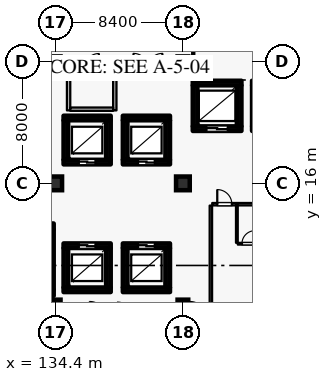
"""IFC4 building model, lengths in metres.
Left out: names, types, materials, properties, quantities, classifications, styles, units other than length and angle.
Written with IfcOpenShell. Run it as: python <this file> out.ifc"""

import sys

from ifc_helpers import new_model, si_unit, direction, frame, frame_2d, origin, origin_2d, place, context, subcontext, project, spatial, rectangle, extrude, element, fill, save


model = new_model("IFC4")
c1 = context("Model", 3, precision=1e-05, world=origin(), true_north=direction((0.0, 1.0)))
c2 = subcontext(c1, "Body", "Model", "MODEL_VIEW")
j1 = project(units=[si_unit("LENGTHUNIT", "METRE"), si_unit("PLANEANGLEUNIT", "RADIAN")], contexts=[c1])
p1 = place(None, origin())
s1 = spatial("IfcSite", under=j1, at=p1, CompositionType="ELEMENT")
p2 = place(p1, origin())
s2 = spatial("IfcBuilding", under=s1, at=p2, CompositionType="ELEMENT")
p3 = place(p2, frame((0.0, 0.0, 16.2)))
s3 = spatial("IfcBuildingStorey", under=s2, at=p3, CompositionType="ELEMENT", Elevation=16.2)
for number, where, z_axis, x_axis in (
    (1, (134.4, 16.0, 0.0), (0.0, 0.0, 1.0), (1.0, 0.0, 0.0)),
    (2, (142.8, 16.0, 0.0), (0.0, 0.0, 1.0), (1.0, 0.0, 0.0)),
):
    element("IfcColumn", number, at=place(p3, frame(where, z_axis=z_axis, x_axis=x_axis)), inside=s3, PredefinedType="COLUMN", context=c2, shape_type="SweptSolid", body=[
        extrude(rectangle(XDim=0.9, YDim=0.9, at=origin_2d()), origin(), (0.0, 0.0, 1.0), 4.8),
    ])
for number, where, z_axis, x_axis in (
    (3, (134.4, 8.0, 0.0), (0.0, 0.0, 1.0), (1.0, 0.0, 0.0)),
    (4, (134.4, 24.0, 0.0), (0.0, 0.0, 1.0), (1.0, 0.0, 0.0)),
    (5, (142.8, 8.0, 0.0), (0.0, 0.0, 1.0), (1.0, 0.0, 0.0)),
    (6, (142.8, 24.0, 0.0), (0.0, 0.0, 1.0), (1.0, 0.0, 0.0)),
):
    element("IfcColumn", number, at=place(p3, frame(where, z_axis=z_axis, x_axis=x_axis)), inside=s3, PredefinedType="COLUMN", context=c2, shape_type="SweptSolid", body=[
        extrude(rectangle(XDim=0.7, YDim=0.7, at=origin_2d()), origin(), (0.0, 0.0, 1.0), 4.8),
    ])
p4 = place(p3, frame((134.95, 17.4, 0.0), z_axis=(0.0, 0.0, 1.0), x_axis=(1.0, 0.0, 0.0)))
e7 = element("IfcWall", 7, at=p4, inside=s3, PredefinedType="SHEAR", context=c2, shape_type="SweptSolid", body=[
    extrude(rectangle(XDim=3.1, YDim=0.3, at=frame_2d((1.55, 0.0))), origin(), (0.0, 0.0, 1.0), 4.535),
])
p5 = place(p4, frame((1.0, 0.0, 0.0)))
e8 = element("IfcOpeningElement", 8, at=p5, cuts=e7, PredefinedType="OPENING", context=c2, shape_type="SweptSolid", body=[
    extrude(rectangle(XDim=1.1, YDim=2.2, at=frame_2d((0.55, 1.1))), frame((0.0, 0.16, 0.0), z_axis=(0.0, -1.0, 0.0), x_axis=(1.0, 0.0, 0.0)), (0.0, 0.0, 1.0), 0.32),
])
p6 = place(p3, frame((137.9, 17.555, 0.0), z_axis=(0.0, 0.0, 1.0), x_axis=(0.0, 1.0, 0.0)))
e9 = element("IfcWall", 9, at=p6, inside=s3, PredefinedType="SHEAR", context=c2, shape_type="SweptSolid", body=[
    extrude(rectangle(XDim=2.59, YDim=0.3, at=frame_2d((1.295, 0.0))), origin(), (0.0, 0.0, 1.0), 4.535),
])
p7 = place(p3, frame((138.05, 20.3, 0.0), z_axis=(0.0, 0.0, 1.0), x_axis=(-1.0, 0.0, 0.0)))
e10 = element("IfcWall", 10, at=p7, inside=s3, PredefinedType="SHEAR", context=c2, shape_type="SweptSolid", body=[
    extrude(rectangle(XDim=3.1, YDim=0.3, at=frame_2d((1.55, 0.0))), origin(), (0.0, 0.0, 1.0), 4.535),
])
p8 = place(p3, frame((135.1, 20.145, 0.0), z_axis=(0.0, 0.0, 1.0), x_axis=(0.0, -1.0, 0.0)))
e11 = element("IfcWall", 11, at=p8, inside=s3, PredefinedType="SHEAR", context=c2, shape_type="SweptSolid", body=[
    extrude(rectangle(XDim=2.59, YDim=0.3, at=frame_2d((1.295, 0.0))), origin(), (0.0, 0.0, 1.0), 4.535),
])
p9 = place(p3, frame((138.85, 17.4, 0.0), z_axis=(0.0, 0.0, 1.0), x_axis=(1.0, 0.0, 0.0)))
e12 = element("IfcWall", 12, at=p9, inside=s3, PredefinedType="SHEAR", context=c2, shape_type="SweptSolid", body=[
    extrude(rectangle(XDim=3.1, YDim=0.3, at=frame_2d((1.55, 0.0))), origin(), (0.0, 0.0, 1.0), 4.535),
])
p10 = place(p9, frame((1.0, 0.0, 0.0)))
e13 = element("IfcOpeningElement", 13, at=p10, cuts=e12, PredefinedType="OPENING", context=c2, shape_type="SweptSolid", body=[
    extrude(rectangle(XDim=1.1, YDim=2.2, at=frame_2d((0.55, 1.1))), frame((0.0, 0.16, 0.0), z_axis=(0.0, -1.0, 0.0), x_axis=(1.0, 0.0, 0.0)), (0.0, 0.0, 1.0), 0.32),
])
p11 = place(p3, frame((141.8, 17.555, 0.0), z_axis=(0.0, 0.0, 1.0), x_axis=(0.0, 1.0, 0.0)))
e14 = element("IfcWall", 14, at=p11, inside=s3, PredefinedType="SHEAR", context=c2, shape_type="SweptSolid", body=[
    extrude(rectangle(XDim=2.59, YDim=0.3, at=frame_2d((1.295, 0.0))), origin(), (0.0, 0.0, 1.0), 4.535),
])
p12 = place(p3, frame((141.95, 20.3, 0.0), z_axis=(0.0, 0.0, 1.0), x_axis=(-1.0, 0.0, 0.0)))
e15 = element("IfcWall", 15, at=p12, inside=s3, PredefinedType="SHEAR", context=c2, shape_type="SweptSolid", body=[
    extrude(rectangle(XDim=3.1, YDim=0.3, at=frame_2d((1.55, 0.0))), origin(), (0.0, 0.0, 1.0), 4.535),
])
p13 = place(p3, frame((139.0, 20.145, 0.0), z_axis=(0.0, 0.0, 1.0), x_axis=(0.0, -1.0, 0.0)))
e16 = element("IfcWall", 16, at=p13, inside=s3, PredefinedType="SHEAR", context=c2, shape_type="SweptSolid", body=[
    extrude(rectangle(XDim=2.59, YDim=0.3, at=frame_2d((1.295, 0.0))), origin(), (0.0, 0.0, 1.0), 4.535),
])
p14 = place(p3, frame((134.95, 9.0, 0.0), z_axis=(0.0, 0.0, 1.0), x_axis=(1.0, 0.0, 0.0)))
e17 = element("IfcWall", 17, at=p14, inside=s3, PredefinedType="SHEAR", context=c2, shape_type="SweptSolid", body=[
    extrude(rectangle(XDim=3.1, YDim=0.3, at=frame_2d((1.55, 0.0))), origin(), (0.0, 0.0, 1.0), 4.535),
])
p15 = place(p3, frame((137.9, 9.155, 0.0), z_axis=(0.0, 0.0, 1.0), x_axis=(0.0, 1.0, 0.0)))
e18 = element("IfcWall", 18, at=p15, inside=s3, PredefinedType="SHEAR", context=c2, shape_type="SweptSolid", body=[
    extrude(rectangle(XDim=2.59, YDim=0.3, at=frame_2d((1.295, 0.0))), origin(), (0.0, 0.0, 1.0), 4.535),
])
p16 = place(p3, frame((138.05, 11.9, 0.0), z_axis=(0.0, 0.0, 1.0), x_axis=(-1.0, 0.0, 0.0)))
e19 = element("IfcWall", 19, at=p16, inside=s3, PredefinedType="SHEAR", context=c2, shape_type="SweptSolid", body=[
    extrude(rectangle(XDim=3.1, YDim=0.3, at=frame_2d((1.55, 0.0))), origin(), (0.0, 0.0, 1.0), 4.535),
])
p17 = place(p16, frame((1.0, 0.0, 0.0)))
e20 = element("IfcOpeningElement", 20, at=p17, cuts=e19, PredefinedType="OPENING", context=c2, shape_type="SweptSolid", body=[
    extrude(rectangle(XDim=1.1, YDim=2.2, at=frame_2d((0.55, 1.1))), frame((0.0, 0.16, 0.0), z_axis=(0.0, -1.0, 0.0), x_axis=(1.0, 0.0, 0.0)), (0.0, 0.0, 1.0), 0.32),
])
p18 = place(p3, frame((135.1, 11.745, 0.0), z_axis=(0.0, 0.0, 1.0), x_axis=(0.0, -1.0, 0.0)))
e21 = element("IfcWall", 21, at=p18, inside=s3, PredefinedType="SHEAR", context=c2, shape_type="SweptSolid", body=[
    extrude(rectangle(XDim=2.59, YDim=0.3, at=frame_2d((1.295, 0.0))), origin(), (0.0, 0.0, 1.0), 4.535),
])
p19 = place(p3, frame((138.85, 9.0, 0.0), z_axis=(0.0, 0.0, 1.0), x_axis=(1.0, 0.0, 0.0)))
e22 = element("IfcWall", 22, at=p19, inside=s3, PredefinedType="SHEAR", context=c2, shape_type="SweptSolid", body=[
    extrude(rectangle(XDim=3.1, YDim=0.3, at=frame_2d((1.55, 0.0))), origin(), (0.0, 0.0, 1.0), 4.535),
])
p20 = place(p3, frame((141.8, 9.155, 0.0), z_axis=(0.0, 0.0, 1.0), x_axis=(0.0, 1.0, 0.0)))
e23 = element("IfcWall", 23, at=p20, inside=s3, PredefinedType="SHEAR", context=c2, shape_type="SweptSolid", body=[
    extrude(rectangle(XDim=2.59, YDim=0.3, at=frame_2d((1.295, 0.0))), origin(), (0.0, 0.0, 1.0), 4.535),
])
p21 = place(p3, frame((141.95, 11.9, 0.0), z_axis=(0.0, 0.0, 1.0), x_axis=(-1.0, 0.0, 0.0)))
e24 = element("IfcWall", 24, at=p21, inside=s3, PredefinedType="SHEAR", context=c2, shape_type="SweptSolid", body=[
    extrude(rectangle(XDim=3.1, YDim=0.3, at=frame_2d((1.55, 0.0))), origin(), (0.0, 0.0, 1.0), 4.535),
])
p22 = place(p21, frame((1.0, 0.0, 0.0)))
e25 = element("IfcOpeningElement", 25, at=p22, cuts=e24, PredefinedType="OPENING", context=c2, shape_type="SweptSolid", body=[
    extrude(rectangle(XDim=1.1, YDim=2.2, at=frame_2d((0.55, 1.1))), frame((0.0, 0.16, 0.0), z_axis=(0.0, -1.0, 0.0), x_axis=(1.0, 0.0, 0.0)), (0.0, 0.0, 1.0), 0.32),
])
p23 = place(p3, frame((139.0, 11.745, 0.0), z_axis=(0.0, 0.0, 1.0), x_axis=(0.0, -1.0, 0.0)))
e26 = element("IfcWall", 26, at=p23, inside=s3, PredefinedType="SHEAR", context=c2, shape_type="SweptSolid", body=[
    extrude(rectangle(XDim=2.59, YDim=0.3, at=frame_2d((1.295, 0.0))), origin(), (0.0, 0.0, 1.0), 4.535),
])
p24 = place(p3, frame((143.45, 19.6, 0.0), z_axis=(0.0, 0.0, 1.0), x_axis=(1.0, 0.0, 0.0)))
e27 = element("IfcWall", 27, at=p24, inside=s3, PredefinedType="SHEAR", context=c2, shape_type="SweptSolid", body=[
    extrude(rectangle(XDim=3.2, YDim=0.3, at=frame_2d((1.6, 0.0))), origin(), (0.0, 0.0, 1.0), 4.535),
])
p25 = place(p24, frame((0.9, 0.0, 0.0)))
e28 = element("IfcOpeningElement", 28, at=p25, cuts=e27, PredefinedType="OPENING", context=c2, shape_type="SweptSolid", body=[
    extrude(rectangle(XDim=1.4, YDim=2.35, at=frame_2d((0.7, 1.175))), frame((0.0, 0.16, 0.0), z_axis=(0.0, -1.0, 0.0), x_axis=(1.0, 0.0, 0.0)), (0.0, 0.0, 1.0), 0.32),
])
p26 = place(p3, frame((146.5, 19.755, 0.0), z_axis=(0.0, 0.0, 1.0), x_axis=(0.0, 1.0, 0.0)))
e29 = element("IfcWall", 29, at=p26, inside=s3, PredefinedType="SHEAR", context=c2, shape_type="SweptSolid", body=[
    extrude(rectangle(XDim=2.69, YDim=0.3, at=frame_2d((1.345, 0.0))), origin(), (0.0, 0.0, 1.0), 4.535),
])
p27 = place(p3, frame((146.65, 22.6, 0.0), z_axis=(0.0, 0.0, 1.0), x_axis=(-1.0, 0.0, 0.0)))
e30 = element("IfcWall", 30, at=p27, inside=s3, PredefinedType="SHEAR", context=c2, shape_type="SweptSolid", body=[
    extrude(rectangle(XDim=3.2, YDim=0.3, at=frame_2d((1.6, 0.0))), origin(), (0.0, 0.0, 1.0), 4.535),
])
p28 = place(p3, frame((143.6, 22.445, 0.0), z_axis=(0.0, 0.0, 1.0), x_axis=(0.0, -1.0, 0.0)))
e31 = element("IfcWall", 31, at=p28, inside=s3, PredefinedType="SHEAR", context=c2, shape_type="SweptSolid", body=[
    extrude(rectangle(XDim=2.69, YDim=0.3, at=frame_2d((1.345, 0.0))), origin(), (0.0, 0.0, 1.0), 4.535),
])
p29 = place(p3, frame((126.1, 8.8, 0.0), z_axis=(0.0, 0.0, 1.0), x_axis=(1.0, 0.0, 0.0)))
e32 = element("IfcWall", 32, at=p29, inside=s3, PredefinedType="SHEAR", context=c2, shape_type="SweptSolid", body=[
    extrude(rectangle(XDim=8.2, YDim=0.4, at=frame_2d((4.1, 0.0))), origin(), (0.0, 0.0, 1.0), 4.535),
])
p30 = place(p3, frame((134.1, 9.005, 0.0), z_axis=(0.0, 0.0, 1.0), x_axis=(0.0, 1.0, 0.0)))
e33 = element("IfcWall", 33, at=p30, inside=s3, PredefinedType="SHEAR", context=c2, shape_type="SweptSolid", body=[
    extrude(rectangle(XDim=3.95, YDim=0.4, at=frame_2d((1.975, 0.0))), origin(), (0.0, 0.0, 1.0), 4.535),
])
p31 = place(p3, frame((126.1, 13.16, 0.0), z_axis=(0.0, 0.0, 1.0), x_axis=(1.0, 0.0, 0.0)))
e34 = element("IfcWall", 34, at=p31, inside=s3, PredefinedType="SHEAR", context=c2, shape_type="SweptSolid", body=[
    extrude(rectangle(XDim=8.2, YDim=0.4, at=frame_2d((4.1, 0.0))), origin(), (0.0, 0.0, 1.0), 4.535),
])
p32 = place(p31, frame((0.43, 0.0, 0.0)))
e35 = element("IfcOpeningElement", 35, at=p32, cuts=e34, PredefinedType="OPENING", context=c2, shape_type="SweptSolid", body=[
    extrude(rectangle(XDim=1.16, YDim=2.2, at=frame_2d((0.58, 1.1))), frame((0.0, 0.21, 0.0), z_axis=(0.0, -1.0, 0.0), x_axis=(1.0, 0.0, 0.0)), (0.0, 0.0, 1.0), 0.42),
])
p33 = place(p3, frame((144.73, 14.63, 0.0), z_axis=(0.0, 0.0, 1.0), x_axis=(1.0, 0.0, 0.0)))
e36 = element("IfcWall", 36, at=p33, inside=s3, PredefinedType="PARTITIONING", context=c2, shape_type="SweptSolid", body=[
    extrude(rectangle(XDim=1.62, YDim=0.16, at=frame_2d((0.81, 0.0))), origin(), (0.0, 0.0, 1.0), 4.535),
])
p34 = place(p33, frame((0.33, 0.0, 0.0)))
e37 = element("IfcOpeningElement", 37, at=p34, cuts=e36, PredefinedType="OPENING", context=c2, shape_type="SweptSolid", body=[
    extrude(rectangle(XDim=0.96, YDim=2.2, at=frame_2d((0.48, 1.1))), frame((0.0, 0.09, 0.0), z_axis=(0.0, -1.0, 0.0), x_axis=(1.0, 0.0, 0.0)), (0.0, 0.0, 1.0), 0.18),
])
p35 = place(p3, frame((146.36, 14.63, 0.0), z_axis=(0.0, 0.0, 1.0), x_axis=(1.0, 0.0, 0.0)))
e38 = element("IfcWall", 38, at=p35, inside=s3, PredefinedType="PARTITIONING", context=c2, shape_type="SweptSolid", body=[
    extrude(rectangle(XDim=1.47, YDim=0.16, at=frame_2d((0.735, 0.0))), origin(), (0.0, 0.0, 1.0), 4.535),
])
p36 = place(p3, frame((146.35, 12.09, 0.0), z_axis=(0.0, 0.0, 1.0), x_axis=(0.0, 1.0, 0.0)))
e39 = element("IfcWall", 39, at=p36, inside=s3, PredefinedType="PARTITIONING", context=c2, shape_type="SweptSolid", body=[
    extrude(rectangle(XDim=2.45, YDim=0.115, at=frame_2d((1.225, 0.0))), origin(), (0.0, 0.0, 1.0), 4.535),
])
p37 = place(p3, frame((146.41, 12.03, 0.0), z_axis=(0.0, 0.0, 1.0), x_axis=(1.0, 0.0, 0.0)))
e40 = element("IfcWall", 40, at=p37, inside=s3, PredefinedType="PARTITIONING", context=c2, shape_type="SweptSolid", body=[
    extrude(rectangle(XDim=1.41, YDim=0.115, at=frame_2d((0.705, 0.0))), origin(), (0.0, 0.0, 1.0), 4.535),
])
p38 = place(p37, frame((0.275, 0.0, 0.0)))
e41 = element("IfcOpeningElement", 41, at=p38, cuts=e40, PredefinedType="OPENING", context=c2, shape_type="SweptSolid", body=[
    extrude(rectangle(XDim=0.86, YDim=2.12, at=frame_2d((0.43, 1.06))), frame((0.0, 0.067, 0.0), z_axis=(0.0, -1.0, 0.0), x_axis=(1.0, 0.0, 0.0)), (0.0, 0.0, 1.0), 0.135),
])
p39 = place(p3, frame((144.64, 5.22, 0.0), z_axis=(0.0, 0.0, 1.0), x_axis=(0.0, 1.0, 0.0)))
e42 = element("IfcWall", 42, at=p39, inside=s3, PredefinedType="PARTITIONING", context=c2, shape_type="SweptSolid", body=[
    extrude(rectangle(XDim=9.32, YDim=0.16, at=frame_2d((4.66, 0.0))), origin(), (0.0, 0.0, 1.0), 4.535),
])
p40 = place(p3, frame((138.96, 23.6, 0.0), z_axis=(0.0, 0.0, 1.0), x_axis=(1.0, 0.0, 0.0)))
e43 = element("IfcWall", 43, at=p40, inside=s3, PredefinedType="PARTITIONING", context=c2, shape_type="SweptSolid", body=[
    extrude(rectangle(XDim=3.08, YDim=0.14, at=frame_2d((1.54, 0.0))), origin(), (0.0, 0.0, 1.0), 4.535),
])
p41 = place(p40, frame((0.59, 0.0, 0.0)))
e44 = element("IfcOpeningElement", 44, at=p41, cuts=e43, PredefinedType="OPENING", context=c2, shape_type="SweptSolid", body=[
    extrude(rectangle(XDim=1.9, YDim=2.4, at=frame_2d((0.95, 1.2))), frame((0.0, 0.08, 0.0), z_axis=(0.0, -1.0, 0.0), x_axis=(1.0, 0.0, 0.0)), (0.0, 0.0, 1.0), 0.16),
])
p42 = place(p3, frame((135.36, 23.6, 0.0), z_axis=(0.0, 0.0, 1.0), x_axis=(1.0, 0.0, 0.0)))
e45 = element("IfcWall", 45, at=p42, inside=s3, PredefinedType="PARTITIONING", context=c2, shape_type="SweptSolid", body=[
    extrude(rectangle(XDim=2.88, YDim=0.22, at=frame_2d((1.44, 0.0))), origin(), (0.0, 0.0, 1.0), 4.535),
])
p43 = place(p42, frame((0.97, 0.0, 0.0)))
e46 = element("IfcOpeningElement", 46, at=p43, cuts=e45, PredefinedType="OPENING", context=c2, shape_type="SweptSolid", body=[
    extrude(rectangle(XDim=0.94, YDim=2.15, at=frame_2d((0.47, 1.075))), frame((0.0, 0.12, 0.0), z_axis=(0.0, -1.0, 0.0), x_axis=(1.0, 0.0, 0.0)), (0.0, 0.0, 1.0), 0.24),
])
p44 = place(p3, frame((143.48, 23.45, 0.0), z_axis=(0.0, 0.0, 1.0), x_axis=(0.0, 1.0, 0.0)))
e47 = element("IfcWall", 47, at=p44, inside=s3, PredefinedType="PARTITIONING", context=c2, shape_type="SweptSolid", body=[
    extrude(rectangle(XDim=3.21, YDim=0.14, at=frame_2d((1.605, 0.0))), origin(), (0.0, 0.0, 1.0), 4.535),
])
for number, where, z_axis, x_axis in (
    (48, (135.28, 20.8, 0.0), (0.0, 0.0, 1.0), (0.0, 1.0, 0.0)),
    (49, (138.32, 20.8, 0.0), (0.0, 0.0, 1.0), (0.0, 1.0, 0.0)),
):
    element("IfcWall", number, at=place(p3, frame(where, z_axis=z_axis, x_axis=x_axis)), inside=s3, PredefinedType="PARTITIONING", context=c2, shape_type="SweptSolid", body=[
        extrude(rectangle(XDim=2.748, YDim=0.22, at=frame_2d((1.374, 0.0))), origin(), (0.0, 0.0, 1.0), 4.535),
    ])
p45 = place(p3, frame((135.39, 20.88, 0.0), z_axis=(0.0, 0.0, 1.0), x_axis=(1.0, 0.0, 0.0)))
e50 = element("IfcWall", 50, at=p45, inside=s3, PredefinedType="PARTITIONING", context=c2, shape_type="SweptSolid", body=[
    extrude(rectangle(XDim=2.82, YDim=0.22, at=frame_2d((1.41, 0.0))), origin(), (0.0, 0.0, 1.0), 4.535),
])
p46 = place(p5, origin())
e51 = element("IfcDoor", 51, at=p46, inside=s3, OperationType="DOUBLE_DOOR_SLIDING", PredefinedType="DOOR", context=c2, shape_type="SweptSolid", body=[
    extrude(rectangle(XDim=1.1, YDim=2.2, at=frame_2d((0.55, 1.1))), frame((0.0, 0.025, 0.0), z_axis=(0.0, -1.0, 0.0), x_axis=(1.0, 0.0, 0.0)), (0.0, 0.0, 1.0), 0.05),
])
fill(e8, e51)
p47 = place(p10, origin())
e52 = element("IfcDoor", 52, at=p47, inside=s3, OperationType="DOUBLE_DOOR_SLIDING", PredefinedType="DOOR", context=c2, shape_type="SweptSolid", body=[
    extrude(rectangle(XDim=1.1, YDim=2.2, at=frame_2d((0.55, 1.1))), frame((0.0, 0.025, 0.0), z_axis=(0.0, -1.0, 0.0), x_axis=(1.0, 0.0, 0.0)), (0.0, 0.0, 1.0), 0.05),
])
fill(e13, e52)
p48 = place(p17, origin())
e53 = element("IfcDoor", 53, at=p48, inside=s3, OperationType="DOUBLE_DOOR_SLIDING", PredefinedType="DOOR", context=c2, shape_type="SweptSolid", body=[
    extrude(rectangle(XDim=1.1, YDim=2.2, at=frame_2d((0.55, 1.1))), frame((0.0, 0.025, 0.0), z_axis=(0.0, -1.0, 0.0), x_axis=(1.0, 0.0, 0.0)), (0.0, 0.0, 1.0), 0.05),
])
fill(e20, e53)
p49 = place(p22, origin())
e54 = element("IfcDoor", 54, at=p49, inside=s3, OperationType="DOUBLE_DOOR_SLIDING", PredefinedType="DOOR", context=c2, shape_type="SweptSolid", body=[
    extrude(rectangle(XDim=1.1, YDim=2.2, at=frame_2d((0.55, 1.1))), frame((0.0, 0.025, 0.0), z_axis=(0.0, -1.0, 0.0), x_axis=(1.0, 0.0, 0.0)), (0.0, 0.0, 1.0), 0.05),
])
fill(e25, e54)
p50 = place(p25, origin())
e55 = element("IfcDoor", 55, at=p50, inside=s3, OperationType="DOUBLE_DOOR_SLIDING", PredefinedType="DOOR", context=c2, shape_type="SweptSolid", body=[
    extrude(rectangle(XDim=1.4, YDim=2.35, at=frame_2d((0.7, 1.175))), frame((0.0, 0.025, 0.0), z_axis=(0.0, -1.0, 0.0), x_axis=(1.0, 0.0, 0.0)), (0.0, 0.0, 1.0), 0.05),
])
fill(e28, e55)
p51 = place(p34, origin())
e56 = element("IfcDoor", 56, at=p51, inside=s3, OperationType="SINGLE_SWING_LEFT", PredefinedType="DOOR", context=c2, shape_type="SweptSolid", body=[
    extrude(rectangle(XDim=0.96, YDim=2.2, at=frame_2d((0.48, 1.1))), frame((0.0, 0.025, 0.0), z_axis=(0.0, -1.0, 0.0), x_axis=(1.0, 0.0, 0.0)), (0.0, 0.0, 1.0), 0.05),
])
fill(e37, e56)
p52 = place(p38, origin())
e57 = element("IfcDoor", 57, at=p52, inside=s3, OperationType="SINGLE_SWING_RIGHT", PredefinedType="DOOR", context=c2, shape_type="SweptSolid", body=[
    extrude(rectangle(XDim=0.86, YDim=2.12, at=frame_2d((0.43, 1.06))), frame((0.0, 0.025, 0.0), z_axis=(0.0, -1.0, 0.0), x_axis=(1.0, 0.0, 0.0)), (0.0, 0.0, 1.0), 0.05),
])
fill(e41, e57)
p53 = place(p41, origin())
e58 = element("IfcDoor", 58, at=p53, inside=s3, OperationType="DOUBLE_DOOR_SINGLE_SWING", PredefinedType="DOOR", context=c2, shape_type="SweptSolid", body=[
    extrude(rectangle(XDim=1.9, YDim=2.4, at=frame_2d((0.95, 1.2))), frame((0.0, 0.025, 0.0), z_axis=(0.0, -1.0, 0.0), x_axis=(1.0, 0.0, 0.0)), (0.0, 0.0, 1.0), 0.05),
])
fill(e44, e58)
p54 = place(p43, origin())
e59 = element("IfcDoor", 59, at=p54, inside=s3, OperationType="SINGLE_SWING_RIGHT", PredefinedType="DOOR", context=c2, shape_type="SweptSolid", body=[
    extrude(rectangle(XDim=0.94, YDim=2.15, at=frame_2d((0.47, 1.075))), frame((0.0, 0.025, 0.0), z_axis=(0.0, -1.0, 0.0), x_axis=(1.0, 0.0, 0.0)), (0.0, 0.0, 1.0), 0.05),
])
fill(e46, e59)
save(model, sys.argv[1])
